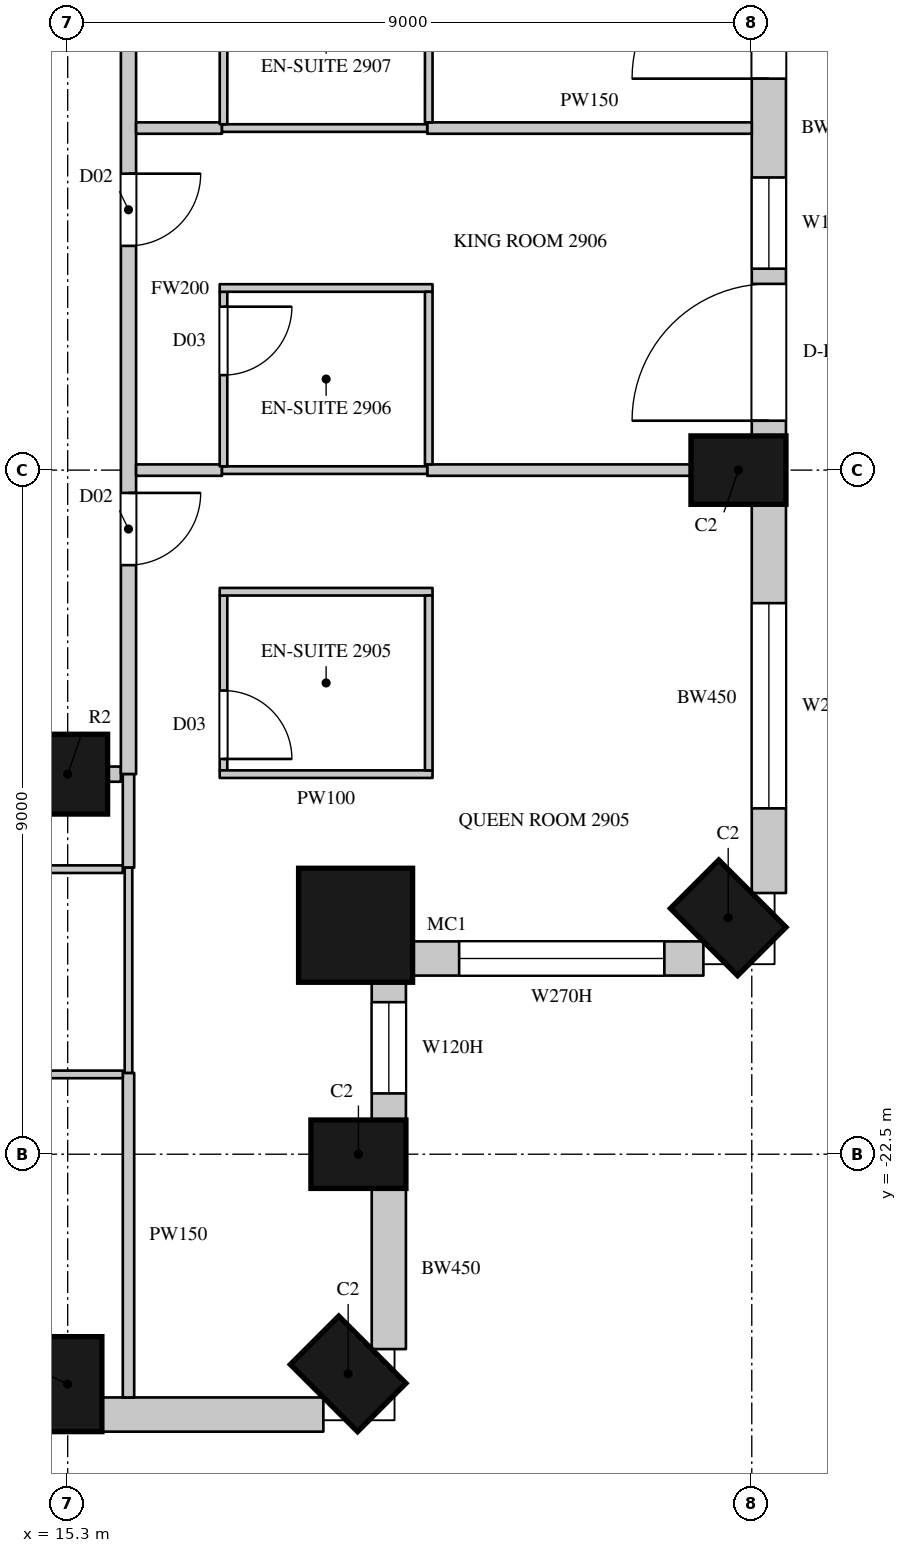
"""IFC4 building model, lengths in metres.
Left out: names, types, materials, properties, quantities, classifications, styles, units other than length and angle.
Written with IfcOpenShell. Run it as: python <this file> out.ifc"""

import sys

from ifc_helpers import new_model, si_unit, direction, frame, frame_2d, origin, origin_2d, place, context, subcontext, project, spatial, rectangle, circle, extrude, element, fill, save


model = new_model("IFC4")
c1 = context("Model", 3, precision=1e-05, world=origin(), true_north=direction((0.0, 1.0)))
c2 = subcontext(c1, "Body", "Model", "MODEL_VIEW")
j1 = project(units=[si_unit("LENGTHUNIT", "METRE"), si_unit("PLANEANGLEUNIT", "RADIAN")], contexts=[c1])
p1 = place(None, origin())
s1 = spatial("IfcSite", under=j1, at=p1, CompositionType="ELEMENT")
p2 = place(p1, origin())
s2 = spatial("IfcBuilding", under=s1, at=p2, CompositionType="ELEMENT")
p3 = place(p2, frame((0.0, 0.0, 134.7)))
s3 = spatial("IfcBuildingStorey", under=s2, at=p3, CompositionType="ELEMENT", Elevation=134.7)
for number, where, z_axis, x_axis in (
    (1, (15.3, -25.525, 0.0), (0.0, 0.0, 1.0), (1.0, 0.0, 0.0)),
    (2, (18.99, -25.39, 0.0), (0.0, 0.0, 1.0), (0.707, 0.707, 0.0)),
    (3, (19.125, -22.5, 0.0), (0.0, 0.0, 1.0), (0.0, 1.0, 0.0)),
):
    element("IfcColumn", number, at=place(p3, frame(where, z_axis=z_axis, x_axis=x_axis)), inside=s3, PredefinedType="COLUMN", context=c2, shape_type="SweptSolid", body=[
        extrude(rectangle(XDim=0.9, YDim=1.25, at=origin_2d()), origin(), (0.0, 0.0, 1.0), 3.6),
    ])
p4 = place(p3, frame((19.088, -19.488, 0.0), z_axis=(0.0, 0.0, 1.0), x_axis=(1.0, 0.0, 0.0)))
e4 = element("IfcColumn", 4, at=p4, inside=s3, PredefinedType="COLUMN", context=c2, shape_type="SweptSolid", body=[
    extrude(circle(Radius=0.75, at=origin_2d()), origin(), (0.0, 0.0, 1.0), 3.6),
])
for number, where, z_axis, x_axis in (
    (5, (23.99, -19.39, 0.0), (0.0, 0.0, 1.0), (0.707, 0.707, 0.0)),
    (6, (24.125, -13.5, 0.0), (0.0, 0.0, 1.0), (0.0, 1.0, 0.0)),
):
    element("IfcColumn", number, at=place(p3, frame(where, z_axis=z_axis, x_axis=x_axis)), inside=s3, PredefinedType="COLUMN", context=c2, shape_type="SweptSolid", body=[
        extrude(rectangle(XDim=0.9, YDim=1.25, at=origin_2d()), origin(), (0.0, 0.0, 1.0), 3.6),
    ])
p5 = place(p3, frame((15.3, -17.5, 0.0), z_axis=(0.0, 0.0, 1.0), x_axis=(1.0, 0.0, 0.0)))
e7 = element("IfcColumn", 7, at=p5, inside=s3, PredefinedType="COLUMN", context=c2, shape_type="SweptSolid", body=[
    extrude(circle(Radius=0.525, at=origin_2d()), origin(), (0.0, 0.0, 1.0), 3.6),
])
p6 = place(p3, frame((15.75, -25.925, 0.0), z_axis=(0.0, 0.0, 1.0), x_axis=(1.0, 0.0, 0.0)))
e8 = element("IfcWall", 8, at=p6, inside=s3, PredefinedType="SOLIDWALL", context=c2, shape_type="SweptSolid", body=[
    extrude(rectangle(XDim=2.914, YDim=0.45, at=frame_2d((1.457, 0.0))), origin(), (0.0, 0.0, 1.0), 3.3),
])
p7 = place(p3, frame((19.525, -25.064, 0.0), z_axis=(0.0, 0.0, 1.0), x_axis=(0.0, 1.0, 0.0)))
e9 = element("IfcWall", 9, at=p7, inside=s3, PredefinedType="SOLIDWALL", context=c2, shape_type="SweptSolid", body=[
    extrude(rectangle(XDim=2.114, YDim=0.45, at=frame_2d((1.057, 0.0))), origin(), (0.0, 0.0, 1.0), 3.3),
])
p8 = place(p3, frame((19.525, -22.05, 0.0), z_axis=(0.0, 0.0, 1.0), x_axis=(0.0, 1.0, 0.0)))
e10 = element("IfcWall", 10, at=p8, inside=s3, PredefinedType="SOLIDWALL", context=c2, shape_type="SweptSolid", body=[
    extrude(rectangle(XDim=1.843, YDim=0.45, at=frame_2d((0.921, 0.0))), origin(), (0.0, 0.0, 1.0), 3.3),
])
p9 = place(p8, frame((0.35, 0.0, 1.05)))
e11 = element("IfcOpeningElement", 11, at=p9, cuts=e10, PredefinedType="OPENING", context=c2, shape_type="SweptSolid", body=[
    extrude(rectangle(XDim=1.2, YDim=2.0, at=frame_2d((0.6, 1.0))), frame((0.0, 0.235, 0.0), z_axis=(0.0, -1.0, 0.0), x_axis=(1.0, 0.0, 0.0)), (0.0, 0.0, 1.0), 0.47),
])
p10 = place(p3, frame((19.807, -19.925, 0.0), z_axis=(0.0, 0.0, 1.0), x_axis=(1.0, 0.0, 0.0)))
e12 = element("IfcWall", 12, at=p10, inside=s3, PredefinedType="SOLIDWALL", context=c2, shape_type="SweptSolid", body=[
    extrude(rectangle(XDim=3.857, YDim=0.45, at=frame_2d((1.928, 0.0))), origin(), (0.0, 0.0, 1.0), 3.3),
])
p11 = place(p10, frame((0.643, 0.0, 1.05)))
e13 = element("IfcOpeningElement", 13, at=p11, cuts=e12, PredefinedType="OPENING", context=c2, shape_type="SweptSolid", body=[
    extrude(rectangle(XDim=2.7, YDim=2.0, at=frame_2d((1.35, 1.0))), frame((0.0, 0.235, 0.0), z_axis=(0.0, -1.0, 0.0), x_axis=(1.0, 0.0, 0.0)), (0.0, 0.0, 1.0), 0.47),
])
p12 = place(p3, frame((24.525, -19.064, 0.0), z_axis=(0.0, 0.0, 1.0), x_axis=(0.0, 1.0, 0.0)))
e14 = element("IfcWall", 14, at=p12, inside=s3, PredefinedType="SOLIDWALL", context=c2, shape_type="SweptSolid", body=[
    extrude(rectangle(XDim=5.114, YDim=0.45, at=frame_2d((2.557, 0.0))), origin(), (0.0, 0.0, 1.0), 3.3),
])
p13 = place(p12, frame((1.114, 0.0, 1.05)))
e15 = element("IfcOpeningElement", 15, at=p13, cuts=e14, PredefinedType="OPENING", context=c2, shape_type="SweptSolid", body=[
    extrude(rectangle(XDim=2.7, YDim=2.0, at=frame_2d((1.35, 1.0))), frame((0.0, 0.235, 0.0), z_axis=(0.0, -1.0, 0.0), x_axis=(1.0, 0.0, 0.0)), (0.0, 0.0, 1.0), 0.47),
])
p14 = place(p3, frame((24.525, -13.05, 0.0), z_axis=(0.0, 0.0, 1.0), x_axis=(0.0, 1.0, 0.0)))
e16 = element("IfcWall", 16, at=p14, inside=s3, PredefinedType="SOLIDWALL", context=c2, shape_type="SweptSolid", body=[
    extrude(rectangle(XDim=8.1, YDim=0.45, at=frame_2d((4.05, 0.0))), origin(), (0.0, 0.0, 1.0), 3.3),
])
p15 = place(p14, frame((0.2, 0.0, 0.0)))
e17 = element("IfcOpeningElement", 17, at=p15, cuts=e16, PredefinedType="OPENING", context=c2, shape_type="SweptSolid", body=[
    extrude(rectangle(XDim=1.8, YDim=2.4, at=frame_2d((0.9, 1.2))), frame((0.0, 0.235, 0.0), z_axis=(0.0, -1.0, 0.0), x_axis=(1.0, 0.0, 0.0)), (0.0, 0.0, 1.0), 0.47),
])
p16 = place(p14, frame((2.2, 0.0, 1.05)))
e18 = element("IfcOpeningElement", 18, at=p16, cuts=e16, PredefinedType="OPENING", context=c2, shape_type="SweptSolid", body=[
    extrude(rectangle(XDim=1.2, YDim=2.0, at=frame_2d((0.6, 1.0))), frame((0.0, 0.235, 0.0), z_axis=(0.0, -1.0, 0.0), x_axis=(1.0, 0.0, 0.0)), (0.0, 0.0, 1.0), 0.47),
])
p17 = place(p14, frame((4.7, 0.0, 0.0)))
e19 = element("IfcOpeningElement", 19, at=p17, cuts=e16, PredefinedType="OPENING", context=c2, shape_type="SweptSolid", body=[
    extrude(rectangle(XDim=1.8, YDim=2.4, at=frame_2d((0.9, 1.2))), frame((0.0, 0.235, 0.0), z_axis=(0.0, -1.0, 0.0), x_axis=(1.0, 0.0, 0.0)), (0.0, 0.0, 1.0), 0.47),
])
p18 = place(p14, frame((6.7, 0.0, 1.05)))
e20 = element("IfcOpeningElement", 20, at=p18, cuts=e16, PredefinedType="OPENING", context=c2, shape_type="SweptSolid", body=[
    extrude(rectangle(XDim=1.2, YDim=2.0, at=frame_2d((0.6, 1.0))), frame((0.0, 0.235, 0.0), z_axis=(0.0, -1.0, 0.0), x_axis=(1.0, 0.0, 0.0)), (0.0, 0.0, 1.0), 0.47),
])
p19 = place(p3, frame((15.825, -17.5, 0.0), z_axis=(0.0, 0.0, 1.0), x_axis=(1.0, 0.0, 0.0)))
e21 = element("IfcWall", 21, at=p19, inside=s3, PredefinedType="PARTITIONING", context=c2, shape_type="SweptSolid", body=[
    extrude(rectangle(XDim=0.175, YDim=0.2, at=frame_2d((0.087, 0.0))), origin(), (0.0, 0.0, 1.0), 3.3),
])
p20 = place(p3, frame((16.1, -17.5, 0.0), z_axis=(0.0, 0.0, 1.0), x_axis=(0.0, 1.0, 0.0)))
e22 = element("IfcWall", 22, at=p20, inside=s3, PredefinedType="PARTITIONING", context=c2, shape_type="SweptSolid", body=[
    extrude(rectangle(XDim=12.75, YDim=0.2, at=frame_2d((6.375, 0.0))), origin(), (0.0, 0.0, 1.0), 3.3),
])
p21 = place(p20, frame((2.75, 0.0, 0.0)))
e23 = element("IfcOpeningElement", 23, at=p21, cuts=e22, PredefinedType="OPENING", context=c2, shape_type="SweptSolid", body=[
    extrude(rectangle(XDim=0.95, YDim=2.2, at=frame_2d((0.475, 1.1))), frame((0.0, 0.11, 0.0), z_axis=(0.0, -1.0, 0.0), x_axis=(1.0, 0.0, 0.0)), (0.0, 0.0, 1.0), 0.22),
])
p22 = place(p20, frame((6.95, 0.0, 0.0)))
e24 = element("IfcOpeningElement", 24, at=p22, cuts=e22, PredefinedType="OPENING", context=c2, shape_type="SweptSolid", body=[
    extrude(rectangle(XDim=0.95, YDim=2.2, at=frame_2d((0.475, 1.1))), frame((0.0, 0.11, 0.0), z_axis=(0.0, -1.0, 0.0), x_axis=(1.0, 0.0, 0.0)), (0.0, 0.0, 1.0), 0.22),
])
p23 = place(p20, frame((11.4, 0.0, 0.0)))
e25 = element("IfcOpeningElement", 25, at=p23, cuts=e22, PredefinedType="OPENING", context=c2, shape_type="SweptSolid", body=[
    extrude(rectangle(XDim=0.95, YDim=2.2, at=frame_2d((0.475, 1.1))), frame((0.0, 0.11, 0.0), z_axis=(0.0, -1.0, 0.0), x_axis=(1.0, 0.0, 0.0)), (0.0, 0.0, 1.0), 0.22),
])
p24 = place(p3, frame((16.1, -25.7, 0.0), z_axis=(0.0, 0.0, 1.0), x_axis=(0.0, 1.0, 0.0)))
e26 = element("IfcWall", 26, at=p24, inside=s3, PredefinedType="PARTITIONING", context=c2, shape_type="SweptSolid", body=[
    extrude(rectangle(XDim=4.27, YDim=0.15, at=frame_2d((2.135, 0.0))), origin(), (0.0, 0.0, 1.0), 3.3),
])
p25 = place(p3, frame((16.1, -18.73, 0.0), z_axis=(0.0, 0.0, 1.0), x_axis=(0.0, 1.0, 0.0)))
e27 = element("IfcWall", 27, at=p25, inside=s3, PredefinedType="PARTITIONING", context=c2, shape_type="SweptSolid", body=[
    extrude(rectangle(XDim=1.23, YDim=0.15, at=frame_2d((0.615, 0.0))), origin(), (0.0, 0.0, 1.0), 3.3),
])
p26 = place(p3, frame((16.2, -13.5, 0.0), z_axis=(0.0, 0.0, 1.0), x_axis=(1.0, 0.0, 0.0)))
e28 = element("IfcWall", 28, at=p26, inside=s3, PredefinedType="PARTITIONING", context=c2, shape_type="SweptSolid", body=[
    extrude(rectangle(XDim=1.13, YDim=0.15, at=frame_2d((0.565, 0.0))), origin(), (0.0, 0.0, 1.0), 3.3),
])
p27 = place(p3, frame((16.2, -9.0, 0.0), z_axis=(0.0, 0.0, 1.0), x_axis=(1.0, 0.0, 0.0)))
e29 = element("IfcWall", 29, at=p27, inside=s3, PredefinedType="PARTITIONING", context=c2, shape_type="SweptSolid", body=[
    extrude(rectangle(XDim=1.13, YDim=0.15, at=frame_2d((0.565, 0.0))), origin(), (0.0, 0.0, 1.0), 2.65),
])
p28 = place(p3, frame((20.03, -13.5, 0.0), z_axis=(0.0, 0.0, 1.0), x_axis=(1.0, 0.0, 0.0)))
e30 = element("IfcWall", 30, at=p28, inside=s3, PredefinedType="PARTITIONING", context=c2, shape_type="SweptSolid", body=[
    extrude(rectangle(XDim=3.47, YDim=0.15, at=frame_2d((1.735, 0.0))), origin(), (0.0, 0.0, 1.0), 3.3),
])
p29 = place(p3, frame((20.03, -9.0, 0.0), z_axis=(0.0, 0.0, 1.0), x_axis=(1.0, 0.0, 0.0)))
e31 = element("IfcWall", 31, at=p29, inside=s3, PredefinedType="PARTITIONING", context=c2, shape_type="SweptSolid", body=[
    extrude(rectangle(XDim=4.27, YDim=0.15, at=frame_2d((2.135, 0.0))), origin(), (0.0, 0.0, 1.0), 2.65),
])
for number, where, z_axis, x_axis in (
    (32, (13.65, -21.45, 0.0), (0.0, 0.0, 1.0), (1.0, 0.0, 0.0)),
    (33, (13.65, -18.75, 0.0), (0.0, 0.0, 1.0), (1.0, 0.0, 0.0)),
):
    element("IfcWall", number, at=place(p3, frame(where, z_axis=z_axis, x_axis=x_axis)), inside=s3, PredefinedType="PARTITIONING", context=c2, shape_type="SweptSolid", body=[
        extrude(rectangle(XDim=2.375, YDim=0.1, at=frame_2d((1.188, 0.0))), origin(), (0.0, 0.0, 1.0), 3.3),
    ])
for number, where, z_axis, x_axis in (
    (34, (16.1, -21.43, 0.0), (0.0, 0.0, 1.0), (0.0, 1.0, 0.0)),
    (35, (17.33, -13.5, 0.0), (0.0, 0.0, 1.0), (1.0, 0.0, 0.0)),
):
    element("IfcWall", number, at=place(p3, frame(where, z_axis=z_axis, x_axis=x_axis)), inside=s3, PredefinedType="PARTITIONING", context=c2, shape_type="SweptSolid", body=[
        extrude(rectangle(XDim=2.7, YDim=0.1, at=frame_2d((1.35, 0.0))), origin(), (0.0, 0.0, 1.0), 3.3),
    ])
p30 = place(p3, frame((17.33, -9.0, 0.0), z_axis=(0.0, 0.0, 1.0), x_axis=(1.0, 0.0, 0.0)))
e36 = element("IfcWall", 36, at=p30, inside=s3, PredefinedType="PARTITIONING", context=c2, shape_type="SweptSolid", body=[
    extrude(rectangle(XDim=2.7, YDim=0.1, at=frame_2d((1.35, 0.0))), origin(), (0.0, 0.0, 1.0), 2.65),
])
p31 = place(p3, frame((17.35, -17.45, 0.0), z_axis=(0.0, 0.0, 1.0), x_axis=(0.0, 1.0, 0.0)))
e37 = element("IfcWall", 37, at=p31, inside=s3, PredefinedType="PARTITIONING", context=c2, shape_type="SweptSolid", body=[
    extrude(rectangle(XDim=2.3, YDim=0.1, at=frame_2d((1.15, 0.0))), origin(), (0.0, 0.0, 1.0), 3.3),
])
p32 = place(p31, frame((0.15, 0.0, 0.0)))
e38 = element("IfcOpeningElement", 38, at=p32, cuts=e37, PredefinedType="OPENING", context=c2, shape_type="SweptSolid", body=[
    extrude(rectangle(XDim=0.9, YDim=2.2, at=frame_2d((0.45, 1.1))), frame((0.0, 0.06, 0.0), z_axis=(0.0, -1.0, 0.0), x_axis=(1.0, 0.0, 0.0)), (0.0, 0.0, 1.0), 0.12),
])
for number, where, z_axis, x_axis in (
    (39, (17.3, -17.5, 0.0), (0.0, 0.0, 1.0), (1.0, 0.0, 0.0)),
    (40, (17.3, -15.1, 0.0), (0.0, 0.0, 1.0), (1.0, 0.0, 0.0)),
):
    element("IfcWall", number, at=place(p3, frame(where, z_axis=z_axis, x_axis=x_axis)), inside=s3, PredefinedType="PARTITIONING", context=c2, shape_type="SweptSolid", body=[
        extrude(rectangle(XDim=2.8, YDim=0.1, at=frame_2d((1.4, 0.0))), origin(), (0.0, 0.0, 1.0), 3.3),
    ])
p33 = place(p3, frame((17.35, -13.45, 0.0), z_axis=(0.0, 0.0, 1.0), x_axis=(0.0, 1.0, 0.0)))
e41 = element("IfcWall", 41, at=p33, inside=s3, PredefinedType="PARTITIONING", context=c2, shape_type="SweptSolid", body=[
    extrude(rectangle(XDim=2.296, YDim=0.1, at=frame_2d((1.148, 0.0))), origin(), (0.0, 0.0, 1.0), 3.3),
])
p34 = place(p33, frame((1.2, 0.0, 0.0)))
e42 = element("IfcOpeningElement", 42, at=p34, cuts=e41, PredefinedType="OPENING", context=c2, shape_type="SweptSolid", body=[
    extrude(rectangle(XDim=0.9, YDim=2.2, at=frame_2d((0.45, 1.1))), frame((0.0, 0.06, 0.0), z_axis=(0.0, -1.0, 0.0), x_axis=(1.0, 0.0, 0.0)), (0.0, 0.0, 1.0), 0.12),
])
p35 = place(p3, frame((17.3, -11.104, 0.0), z_axis=(0.0, 0.0, 1.0), x_axis=(1.0, 0.0, 0.0)))
e43 = element("IfcWall", 43, at=p35, inside=s3, PredefinedType="PARTITIONING", context=c2, shape_type="SweptSolid", body=[
    extrude(rectangle(XDim=2.8, YDim=0.1, at=frame_2d((1.4, 0.0))), origin(), (0.0, 0.0, 1.0), 3.3),
])
p36 = place(p3, frame((17.35, -8.95, 0.0), z_axis=(0.0, 0.0, 1.0), x_axis=(0.000407580973, 0.999999916939, 0.0)))
e44 = element("IfcWall", 44, at=p36, inside=s3, PredefinedType="PARTITIONING", context=c2, shape_type="SweptSolid", body=[
    extrude(rectangle(XDim=2.396, YDim=0.1, at=frame_2d((1.198, 0.0))), origin(), (0.0, 0.0, 1.0), 3.3),
])
p37 = place(p36, frame((1.25, 0.0, 0.0)))
e45 = element("IfcOpeningElement", 45, at=p37, cuts=e44, PredefinedType="OPENING", context=c2, shape_type="SweptSolid", body=[
    extrude(rectangle(XDim=0.9, YDim=2.2, at=frame_2d((0.45, 1.1))), frame((0.0, 0.06, 0.0), z_axis=(0.0, -1.0, 0.0), x_axis=(1.0, 0.0, 0.0)), (0.0, 0.0, 1.0), 0.12),
])
p38 = place(p3, frame((20.05, -17.45, 0.0), z_axis=(0.0, 0.0, 1.0), x_axis=(0.0, 1.0, 0.0)))
e46 = element("IfcWall", 46, at=p38, inside=s3, PredefinedType="PARTITIONING", context=c2, shape_type="SweptSolid", body=[
    extrude(rectangle(XDim=2.3, YDim=0.1, at=frame_2d((1.15, 0.0))), origin(), (0.0, 0.0, 1.0), 3.3),
])
p39 = place(p3, frame((20.05, -13.425, 0.0), z_axis=(0.0, 0.0, 1.0), x_axis=(0.0, 1.0, 0.0)))
e47 = element("IfcWall", 47, at=p39, inside=s3, PredefinedType="PARTITIONING", context=c2, shape_type="SweptSolid", body=[
    extrude(rectangle(XDim=2.271, YDim=0.1, at=frame_2d((1.135, 0.0))), origin(), (0.0, 0.0, 1.0), 3.3),
])
p40 = place(p3, frame((20.05, -8.925, 0.0), z_axis=(0.0, 0.0, 1.0), x_axis=(0.000430200003, 0.999999907464, 0.0)))
e48 = element("IfcWall", 48, at=p40, inside=s3, PredefinedType="PARTITIONING", context=c2, shape_type="SweptSolid", body=[
    extrude(rectangle(XDim=2.27, YDim=0.1, at=frame_2d((1.135, 0.0))), origin(), (0.0, 0.0, 1.0), 3.3),
])
p41 = place(p9, origin())
e49 = element("IfcWindow", 49, at=p41, inside=s3, PartitioningType="SINGLE_PANEL", PredefinedType="WINDOW", context=c2, shape_type="SweptSolid", body=[
    extrude(rectangle(XDim=1.2, YDim=2.0, at=frame_2d((0.6, 1.0))), frame((0.0, 0.135, 0.0), z_axis=(0.0, -1.0, 0.0), x_axis=(1.0, 0.0, 0.0)), (0.0, 0.0, 1.0), 0.06),
])
fill(e11, e49)
p42 = place(p11, origin())
e50 = element("IfcWindow", 50, at=p42, inside=s3, PartitioningType="SINGLE_PANEL", PredefinedType="WINDOW", context=c2, shape_type="SweptSolid", body=[
    extrude(rectangle(XDim=2.7, YDim=2.0, at=frame_2d((1.35, 1.0))), frame((0.0, 0.135, 0.0), z_axis=(0.0, -1.0, 0.0), x_axis=(1.0, 0.0, 0.0)), (0.0, 0.0, 1.0), 0.06),
])
fill(e13, e50)
p43 = place(p13, origin())
e51 = element("IfcWindow", 51, at=p43, inside=s3, PartitioningType="SINGLE_PANEL", PredefinedType="WINDOW", context=c2, shape_type="SweptSolid", body=[
    extrude(rectangle(XDim=2.7, YDim=2.0, at=frame_2d((1.35, 1.0))), frame((0.0, 0.135, 0.0), z_axis=(0.0, -1.0, 0.0), x_axis=(1.0, 0.0, 0.0)), (0.0, 0.0, 1.0), 0.06),
])
fill(e15, e51)
p44 = place(p15, origin())
e52 = element("IfcDoor", 52, at=p44, inside=s3, OperationType="SLIDING_TO_LEFT", PredefinedType="DOOR", context=c2, shape_type="SweptSolid", body=[
    extrude(rectangle(XDim=1.8, YDim=2.4, at=frame_2d((0.9, 1.2))), frame((0.0, 0.13, 0.0), z_axis=(0.0, -1.0, 0.0), x_axis=(1.0, 0.0, 0.0)), (0.0, 0.0, 1.0), 0.05),
])
fill(e17, e52)
p45 = place(p16, origin())
e53 = element("IfcWindow", 53, at=p45, inside=s3, PartitioningType="SINGLE_PANEL", PredefinedType="WINDOW", context=c2, shape_type="SweptSolid", body=[
    extrude(rectangle(XDim=1.2, YDim=2.0, at=frame_2d((0.6, 1.0))), frame((0.0, 0.135, 0.0), z_axis=(0.0, -1.0, 0.0), x_axis=(1.0, 0.0, 0.0)), (0.0, 0.0, 1.0), 0.06),
])
fill(e18, e53)
p46 = place(p17, origin())
e54 = element("IfcDoor", 54, at=p46, inside=s3, OperationType="SLIDING_TO_LEFT", PredefinedType="DOOR", context=c2, shape_type="SweptSolid", body=[
    extrude(rectangle(XDim=1.8, YDim=2.4, at=frame_2d((0.9, 1.2))), frame((0.0, 0.13, 0.0), z_axis=(0.0, -1.0, 0.0), x_axis=(1.0, 0.0, 0.0)), (0.0, 0.0, 1.0), 0.05),
])
fill(e19, e54)
p47 = place(p21, origin())
e55 = element("IfcDoor", 55, at=p47, inside=s3, OperationType="SINGLE_SWING_LEFT", PredefinedType="DOOR", context=c2, shape_type="SweptSolid", body=[
    extrude(rectangle(XDim=0.95, YDim=2.2, at=frame_2d((0.475, 1.1))), frame((0.0, 0.025, 0.0), z_axis=(0.0, -1.0, 0.0), x_axis=(1.0, 0.0, 0.0)), (0.0, 0.0, 1.0), 0.05),
])
fill(e23, e55)
p48 = place(p32, origin())
e56 = element("IfcDoor", 56, at=p48, inside=s3, OperationType="SINGLE_SWING_RIGHT", PredefinedType="DOOR", context=c2, shape_type="SweptSolid", body=[
    extrude(rectangle(XDim=0.9, YDim=2.2, at=frame_2d((0.45, 1.1))), frame((0.0, 0.025, 0.0), z_axis=(0.0, -1.0, 0.0), x_axis=(1.0, 0.0, 0.0)), (0.0, 0.0, 1.0), 0.05),
])
fill(e38, e56)
p49 = place(p22, origin())
e57 = element("IfcDoor", 57, at=p49, inside=s3, OperationType="SINGLE_SWING_LEFT", PredefinedType="DOOR", context=c2, shape_type="SweptSolid", body=[
    extrude(rectangle(XDim=0.95, YDim=2.2, at=frame_2d((0.475, 1.1))), frame((0.0, 0.025, 0.0), z_axis=(0.0, -1.0, 0.0), x_axis=(1.0, 0.0, 0.0)), (0.0, 0.0, 1.0), 0.05),
])
fill(e24, e57)
p50 = place(p34, origin())
e58 = element("IfcDoor", 58, at=p50, inside=s3, OperationType="SINGLE_SWING_LEFT", PredefinedType="DOOR", context=c2, shape_type="SweptSolid", body=[
    extrude(rectangle(XDim=0.9, YDim=2.2, at=frame_2d((0.45, 1.1))), frame((0.0, 0.025, 0.0), z_axis=(0.0, -1.0, 0.0), x_axis=(1.0, 0.0, 0.0)), (0.0, 0.0, 1.0), 0.05),
])
fill(e42, e58)
save(model, sys.argv[1])
